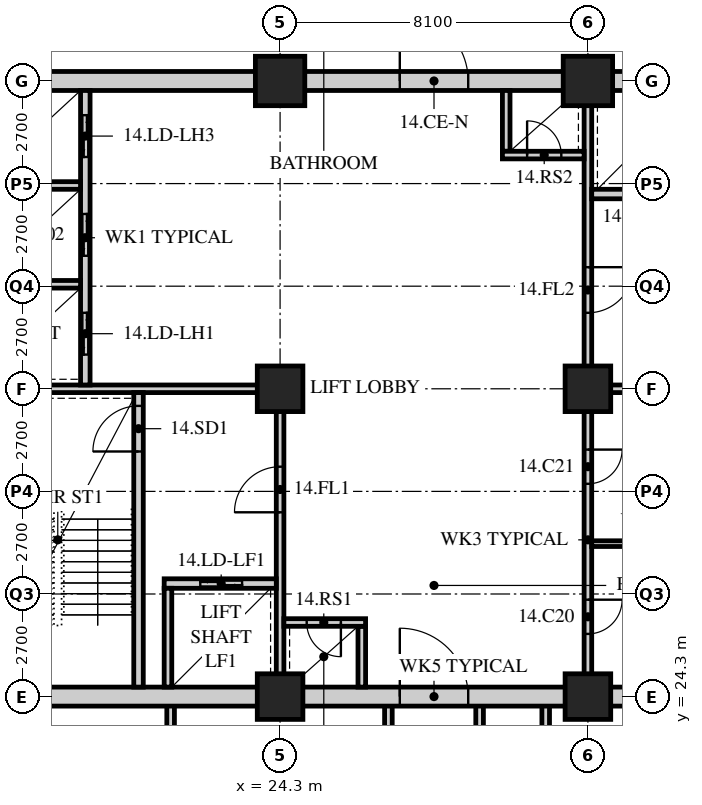
"""IFC4 building model, lengths in metres.
Left out: names, types, materials, properties, quantities, classifications, styles, units other than length and angle.
Written with IfcOpenShell. Run it as: python <this file> out.ifc"""

import sys

from ifc_helpers import new_model, si_unit, direction, frame, frame_2d, origin, origin_2d, place, context, subcontext, project, spatial, rectangle, hollow_rectangle, extrude, element, fill, save


model = new_model("IFC4")
c1 = context("Model", 3, precision=1e-05, world=origin(), true_north=direction((0.0, 1.0)))
c2 = subcontext(c1, "Body", "Model", "MODEL_VIEW")
j1 = project(units=[si_unit("LENGTHUNIT", "METRE"), si_unit("PLANEANGLEUNIT", "RADIAN")], contexts=[c1])
p1 = place(None, origin())
s1 = spatial("IfcSite", under=j1, at=p1, CompositionType="ELEMENT")
p2 = place(p1, origin())
s2 = spatial("IfcBuilding", under=s1, at=p2, CompositionType="ELEMENT")
p3 = place(p2, frame((0.0, 0.0, 60.2)))
s3 = spatial("IfcBuildingStorey", under=s2, at=p3, CompositionType="ELEMENT", Elevation=60.2)
for number, where, z_axis, x_axis in (
    (1, (24.3, 24.3, 0.0), (0.0, 0.0, 1.0), (1.0, 0.0, 0.0)),
    (2, (24.3, 32.4, 0.0), (0.0, 0.0, 1.0), (1.0, 0.0, 0.0)),
):
    element("IfcColumn", number, at=place(p3, frame(where, z_axis=z_axis, x_axis=x_axis)), inside=s3, PredefinedType="COLUMN", context=c2, shape_type="SweptSolid", body=[
        extrude(hollow_rectangle(XDim=1.2, YDim=1.2, WallThickness=0.12, at=origin_2d()), origin(), (0.0, 0.0, 1.0), 3.4),
    ])
p4 = place(p3, frame((24.3, 40.5, 0.0), z_axis=(0.0, 0.0, 1.0), x_axis=(1.0, 0.0, 0.0)))
e3 = element("IfcColumn", 3, at=p4, inside=s3, PredefinedType="COLUMN", context=c2, shape_type="SweptSolid", body=[
    extrude(hollow_rectangle(XDim=1.3, YDim=1.3, WallThickness=0.13, at=origin_2d()), origin(), (0.0, 0.0, 1.0), 3.4),
])
for number, where, z_axis, x_axis in (
    (4, (32.4, 24.3, 0.0), (0.0, 0.0, 1.0), (1.0, 0.0, 0.0)),
    (5, (32.4, 32.4, 0.0), (0.0, 0.0, 1.0), (1.0, 0.0, 0.0)),
):
    element("IfcColumn", number, at=place(p3, frame(where, z_axis=z_axis, x_axis=x_axis)), inside=s3, PredefinedType="COLUMN", context=c2, shape_type="SweptSolid", body=[
        extrude(hollow_rectangle(XDim=1.2, YDim=1.2, WallThickness=0.12, at=origin_2d()), origin(), (0.0, 0.0, 1.0), 3.4),
    ])
p5 = place(p3, frame((32.4, 40.5, 0.0), z_axis=(0.0, 0.0, 1.0), x_axis=(1.0, 0.0, 0.0)))
e6 = element("IfcColumn", 6, at=p5, inside=s3, PredefinedType="COLUMN", context=c2, shape_type="SweptSolid", body=[
    extrude(hollow_rectangle(XDim=1.3, YDim=1.3, WallThickness=0.13, at=origin_2d()), origin(), (0.0, 0.0, 1.0), 3.4),
])
for number, where, z_axis, x_axis in (
    (7, (21.42, 13.95, 0.0), (0.0, 0.0, 1.0), (0.0, 1.0, 0.0)),
    (8, (31.289, 13.95, 0.0), (0.0, 0.0, 1.0), (0.0, 1.0, 0.0)),
    (9, (27.15, 13.95, 0.0), (0.0, 0.0, 1.0), (0.0, 1.0, 0.0)),
    (10, (29.55, 13.95, 0.0), (0.0, 0.0, 1.0), (0.0, 1.0, 0.0)),
):
    element("IfcWall", number, at=place(p3, frame(where, z_axis=z_axis, x_axis=x_axis)), inside=s3, PredefinedType="SOLIDWALL", context=c2, shape_type="SweptSolid", body=[
        extrude(rectangle(XDim=10.35, YDim=0.2, at=frame_2d((5.175, 0.0))), origin(), (0.0, 0.0, 1.0), 3.19),
    ])
p6 = place(p3, frame((15.95, 24.3, 0.0), z_axis=(0.0, 0.0, 1.0), x_axis=(1.0, 0.0, 0.0)))
e11 = element("IfcWall", 11, at=p6, inside=s3, PredefinedType="SOLIDWALL", context=c2, shape_type="SweptSolid", body=[
    extrude(rectangle(XDim=24.8, YDim=0.5, at=frame_2d((12.4, 0.0))), origin(), (0.0, 0.0, 1.0), 2.54),
])
p7 = place(p6, frame((11.5, 0.0, 0.0)))
e12 = element("IfcOpeningElement", 12, at=p7, cuts=e11, PredefinedType="OPENING", context=c2, shape_type="SweptSolid", body=[
    extrude(rectangle(XDim=1.8, YDim=2.4, at=frame_2d((0.9, 1.2))), frame((0.0, 0.26, 0.0), z_axis=(0.0, -1.0, 0.0), x_axis=(1.0, 0.0, 0.0)), (0.0, 0.0, 1.0), 0.52),
])
p8 = place(p3, frame((15.95, 40.5, 0.0), z_axis=(0.0, 0.0, 1.0), x_axis=(1.0, 0.0, 0.0)))
e13 = element("IfcWall", 13, at=p8, inside=s3, PredefinedType="SOLIDWALL", context=c2, shape_type="SweptSolid", body=[
    extrude(rectangle(XDim=24.8, YDim=0.5, at=frame_2d((12.4, 0.0))), origin(), (0.0, 0.0, 1.0), 2.54),
])
p9 = place(p8, frame((11.5, 0.0, 0.0)))
e14 = element("IfcOpeningElement", 14, at=p9, cuts=e13, PredefinedType="OPENING", context=c2, shape_type="SweptSolid", body=[
    extrude(rectangle(XDim=1.8, YDim=2.4, at=frame_2d((0.9, 1.2))), frame((0.0, 0.26, 0.0), z_axis=(0.0, -1.0, 0.0), x_axis=(1.0, 0.0, 0.0)), (0.0, 0.0, 1.0), 0.52),
])
p10 = place(p3, frame((16.45, 32.4, 0.0), z_axis=(0.0, 0.0, 1.0), x_axis=(1.0, 0.0, 0.0)))
e15 = element("IfcWall", 15, at=p10, inside=s3, PredefinedType="SOLIDWALL", context=c2, shape_type="SweptSolid", body=[
    extrude(rectangle(XDim=7.95, YDim=0.2, at=frame_2d((3.975, 0.0))), origin(), (0.0, 0.0, 1.0), 2.578),
])
p11 = place(p3, frame((24.3, 24.55, 0.0), z_axis=(0.0, 0.0, 1.0), x_axis=(0.0, 1.0, 0.0)))
e16 = element("IfcWall", 16, at=p11, inside=s3, PredefinedType="SOLIDWALL", context=c2, shape_type="SweptSolid", body=[
    extrude(rectangle(XDim=7.75, YDim=0.2, at=frame_2d((3.875, 0.0))), origin(), (0.0, 0.0, 1.0), 2.578),
])
p12 = place(p11, frame((4.6, 0.0, 0.0)))
e17 = element("IfcOpeningElement", 17, at=p12, cuts=e16, PredefinedType="OPENING", context=c2, shape_type="SweptSolid", body=[
    extrude(rectangle(XDim=1.2, YDim=2.1, at=frame_2d((0.6, 1.05))), frame((0.0, 0.11, 0.0), z_axis=(0.0, -1.0, 0.0), x_axis=(1.0, 0.0, 0.0)), (0.0, 0.0, 1.0), 0.22),
])
p13 = place(p3, frame((20.575, 24.55, 0.0), z_axis=(0.0, 0.0, 1.0), x_axis=(0.0, 1.0, 0.0)))
e18 = element("IfcWall", 18, at=p13, inside=s3, PredefinedType="SOLIDWALL", context=c2, shape_type="SweptSolid", body=[
    extrude(rectangle(XDim=7.75, YDim=0.25, at=frame_2d((3.875, 0.0))), origin(), (0.0, 0.0, 1.0), 3.19),
])
p14 = place(p13, frame((6.2, 0.0, 0.0)))
e19 = element("IfcOpeningElement", 19, at=p14, cuts=e18, PredefinedType="OPENING", context=c2, shape_type="SweptSolid", body=[
    extrude(rectangle(XDim=1.2, YDim=2.1, at=frame_2d((0.6, 1.05))), frame((0.0, 0.135, 0.0), z_axis=(0.0, -1.0, 0.0), x_axis=(1.0, 0.0, 0.0)), (0.0, 0.0, 1.0), 0.27),
])
p15 = place(p3, frame((21.25, 27.275, 0.0), z_axis=(0.0, 0.0, 1.0), x_axis=(1.0, 0.0, 0.0)))
e20 = element("IfcWall", 20, at=p15, inside=s3, PredefinedType="SOLIDWALL", context=c2, shape_type="SweptSolid", body=[
    extrude(rectangle(XDim=2.95, YDim=0.25, at=frame_2d((1.475, 0.0))), origin(), (0.0, 0.0, 1.0), 3.19),
])
p16 = place(p15, frame((0.95, 0.0, 0.0)))
e21 = element("IfcOpeningElement", 21, at=p16, cuts=e20, PredefinedType="OPENING", context=c2, shape_type="SweptSolid", body=[
    extrude(rectangle(XDim=1.1, YDim=2.4, at=frame_2d((0.55, 1.2))), frame((0.0, 0.135, 0.0), z_axis=(0.0, -1.0, 0.0), x_axis=(1.0, 0.0, 0.0)), (0.0, 0.0, 1.0), 0.27),
])
p17 = place(p3, frame((21.35, 24.55, 0.0), z_axis=(0.0, 0.0, 1.0), x_axis=(0.0, 1.0, 0.0)))
e22 = element("IfcWall", 22, at=p17, inside=s3, PredefinedType="SOLIDWALL", context=c2, shape_type="SweptSolid", body=[
    extrude(rectangle(XDim=2.6, YDim=0.2, at=frame_2d((1.3, 0.0))), origin(), (0.0, 0.0, 1.0), 3.19),
])
p18 = place(p3, frame((19.175, 32.5, 0.0), z_axis=(0.0, 0.0, 1.0), x_axis=(0.0, 1.0, 0.0)))
e23 = element("IfcWall", 23, at=p18, inside=s3, PredefinedType="SOLIDWALL", context=c2, shape_type="SweptSolid", body=[
    extrude(rectangle(XDim=7.75, YDim=0.25, at=frame_2d((3.875, 0.0))), origin(), (0.0, 0.0, 1.0), 3.19),
])
p19 = place(p18, frame((0.8, 0.0, 0.0)))
e24 = element("IfcOpeningElement", 24, at=p19, cuts=e23, PredefinedType="OPENING", context=c2, shape_type="SweptSolid", body=[
    extrude(rectangle(XDim=1.1, YDim=2.4, at=frame_2d((0.55, 1.2))), frame((0.0, 0.135, 0.0), z_axis=(0.0, -1.0, 0.0), x_axis=(1.0, 0.0, 0.0)), (0.0, 0.0, 1.0), 0.27),
])
p20 = place(p18, frame((3.4, 0.0, 0.0)))
e25 = element("IfcOpeningElement", 25, at=p20, cuts=e23, PredefinedType="OPENING", context=c2, shape_type="SweptSolid", body=[
    extrude(rectangle(XDim=1.1, YDim=2.4, at=frame_2d((0.55, 1.2))), frame((0.0, 0.135, 0.0), z_axis=(0.0, -1.0, 0.0), x_axis=(1.0, 0.0, 0.0)), (0.0, 0.0, 1.0), 0.27),
])
p21 = place(p18, frame((6.0, 0.0, 0.0)))
e26 = element("IfcOpeningElement", 26, at=p21, cuts=e23, PredefinedType="OPENING", context=c2, shape_type="SweptSolid", body=[
    extrude(rectangle(XDim=1.1, YDim=2.4, at=frame_2d((0.55, 1.2))), frame((0.0, 0.135, 0.0), z_axis=(0.0, -1.0, 0.0), x_axis=(1.0, 0.0, 0.0)), (0.0, 0.0, 1.0), 0.27),
])
for number, where, z_axis, x_axis in (
    (27, (16.45, 35.15, 0.0), (0.0, 0.0, 1.0), (1.0, 0.0, 0.0)),
    (28, (16.45, 37.75, 0.0), (0.0, 0.0, 1.0), (1.0, 0.0, 0.0)),
):
    element("IfcWall", number, at=place(p3, frame(where, z_axis=z_axis, x_axis=x_axis)), inside=s3, PredefinedType="SOLIDWALL", context=c2, shape_type="SweptSolid", body=[
        extrude(rectangle(XDim=2.6, YDim=0.2, at=frame_2d((1.3, 0.0))), origin(), (0.0, 0.0, 1.0), 3.19),
    ])
p22 = place(p3, frame((26.45, 24.55, 0.0), z_axis=(0.0, 0.0, 1.0), x_axis=(0.0, 1.0, 0.0)))
e29 = element("IfcWall", 29, at=p22, inside=s3, PredefinedType="SOLIDWALL", context=c2, shape_type="SweptSolid", body=[
    extrude(rectangle(XDim=1.6, YDim=0.2, at=frame_2d((0.8, 0.0))), origin(), (0.0, 0.0, 1.0), 3.19),
])
p23 = place(p3, frame((24.4, 26.25, 0.0), z_axis=(0.0, 0.0, 1.0), x_axis=(1.0, 0.0, 0.0)))
e30 = element("IfcWall", 30, at=p23, inside=s3, PredefinedType="SOLIDWALL", context=c2, shape_type="SweptSolid", body=[
    extrude(rectangle(XDim=2.15, YDim=0.2, at=frame_2d((1.075, 0.0))), origin(), (0.0, 0.0, 1.0), 3.19),
])
p24 = place(p23, frame((0.6, 0.0, 0.0)))
e31 = element("IfcOpeningElement", 31, at=p24, cuts=e30, PredefinedType="OPENING", context=c2, shape_type="SweptSolid", body=[
    extrude(rectangle(XDim=0.9, YDim=2.1, at=frame_2d((0.45, 1.05))), frame((0.0, 0.11, 0.0), z_axis=(0.0, -1.0, 0.0), x_axis=(1.0, 0.0, 0.0)), (0.0, 0.0, 1.0), 0.22),
])
p25 = place(p3, frame((32.3, 32.4, 0.0), z_axis=(0.0, 0.0, 1.0), x_axis=(1.0, 0.0, 0.0)))
e32 = element("IfcWall", 32, at=p25, inside=s3, PredefinedType="SOLIDWALL", context=c2, shape_type="SweptSolid", body=[
    extrude(rectangle(XDim=7.95, YDim=0.2, at=frame_2d((3.975, 0.0))), origin(), (0.0, 0.0, 1.0), 2.578),
])
p26 = place(p3, frame((32.4, 32.5, 0.0), z_axis=(0.0, 0.0, 1.0), x_axis=(0.0, 1.0, 0.0)))
e33 = element("IfcWall", 33, at=p26, inside=s3, PredefinedType="SOLIDWALL", context=c2, shape_type="SweptSolid", body=[
    extrude(rectangle(XDim=7.75, YDim=0.2, at=frame_2d((3.875, 0.0))), origin(), (0.0, 0.0, 1.0), 2.578),
])
p27 = place(p26, frame((1.9, 0.0, 0.0)))
e34 = element("IfcOpeningElement", 34, at=p27, cuts=e33, PredefinedType="OPENING", context=c2, shape_type="SweptSolid", body=[
    extrude(rectangle(XDim=1.2, YDim=2.1, at=frame_2d((0.6, 1.05))), frame((0.0, 0.11, 0.0), z_axis=(0.0, -1.0, 0.0), x_axis=(1.0, 0.0, 0.0)), (0.0, 0.0, 1.0), 0.22),
])
p28 = place(p3, frame((32.5, 37.525, 0.0), z_axis=(0.0, 0.0, 1.0), x_axis=(1.0, 0.0, 0.0)))
e35 = element("IfcWall", 35, at=p28, inside=s3, PredefinedType="SOLIDWALL", context=c2, shape_type="SweptSolid", body=[
    extrude(rectangle(XDim=2.95, YDim=0.25, at=frame_2d((1.475, 0.0))), origin(), (0.0, 0.0, 1.0), 3.19),
])
p29 = place(p28, frame((0.9, 0.0, 0.0)))
e36 = element("IfcOpeningElement", 36, at=p29, cuts=e35, PredefinedType="OPENING", context=c2, shape_type="SweptSolid", body=[
    extrude(rectangle(XDim=1.1, YDim=2.4, at=frame_2d((0.55, 1.2))), frame((0.0, 0.135, 0.0), z_axis=(0.0, -1.0, 0.0), x_axis=(1.0, 0.0, 0.0)), (0.0, 0.0, 1.0), 0.27),
])
p30 = place(p3, frame((30.25, 38.65, 0.0), z_axis=(0.0, 0.0, 1.0), x_axis=(0.0, 1.0, 0.0)))
e37 = element("IfcWall", 37, at=p30, inside=s3, PredefinedType="SOLIDWALL", context=c2, shape_type="SweptSolid", body=[
    extrude(rectangle(XDim=1.6, YDim=0.2, at=frame_2d((0.8, 0.0))), origin(), (0.0, 0.0, 1.0), 3.19),
])
p31 = place(p3, frame((30.15, 38.55, 0.0), z_axis=(0.0, 0.0, 1.0), x_axis=(1.0, 0.0, 0.0)))
e38 = element("IfcWall", 38, at=p31, inside=s3, PredefinedType="SOLIDWALL", context=c2, shape_type="SweptSolid", body=[
    extrude(rectangle(XDim=2.15, YDim=0.2, at=frame_2d((1.075, 0.0))), origin(), (0.0, 0.0, 1.0), 3.19),
])
p32 = place(p31, frame((0.65, 0.0, 0.0)))
e39 = element("IfcOpeningElement", 39, at=p32, cuts=e38, PredefinedType="OPENING", context=c2, shape_type="SweptSolid", body=[
    extrude(rectangle(XDim=0.9, YDim=2.1, at=frame_2d((0.45, 1.05))), frame((0.0, 0.11, 0.0), z_axis=(0.0, -1.0, 0.0), x_axis=(1.0, 0.0, 0.0)), (0.0, 0.0, 1.0), 0.22),
])
p33 = place(p3, frame((32.4, 24.55, 0.0), z_axis=(0.0, 0.0, 1.0), x_axis=(0.0, 1.0, 0.0)))
e40 = element("IfcWall", 40, at=p33, inside=s3, PredefinedType="PARTITIONING", context=c2, shape_type="SweptSolid", body=[
    extrude(rectangle(XDim=7.75, YDim=0.2, at=frame_2d((3.875, 0.0))), origin(), (0.0, 0.0, 1.0), 2.578),
])
p34 = place(p33, frame((1.4, 0.0, 0.0)))
e41 = element("IfcOpeningElement", 41, at=p34, cuts=e40, PredefinedType="OPENING", context=c2, shape_type="SweptSolid", body=[
    extrude(rectangle(XDim=0.9, YDim=2.1, at=frame_2d((0.45, 1.05))), frame((0.0, 0.11, 0.0), z_axis=(0.0, -1.0, 0.0), x_axis=(1.0, 0.0, 0.0)), (0.0, 0.0, 1.0), 0.22),
])
p35 = place(p33, frame((5.35, 0.0, 0.0)))
e42 = element("IfcOpeningElement", 42, at=p35, cuts=e40, PredefinedType="OPENING", context=c2, shape_type="SweptSolid", body=[
    extrude(rectangle(XDim=0.9, YDim=2.1, at=frame_2d((0.45, 1.05))), frame((0.0, 0.11, 0.0), z_axis=(0.0, -1.0, 0.0), x_axis=(1.0, 0.0, 0.0)), (0.0, 0.0, 1.0), 0.22),
])
p36 = place(p3, frame((32.5, 28.325, 0.0), z_axis=(0.0, 0.0, 1.0), x_axis=(1.0, 0.0, 0.0)))
e43 = element("IfcWall", 43, at=p36, inside=s3, PredefinedType="PARTITIONING", context=c2, shape_type="SweptSolid", body=[
    extrude(rectangle(XDim=4.9, YDim=0.15, at=frame_2d((2.45, 0.0))), origin(), (0.0, 0.0, 1.0), 3.19),
])
p37 = place(p34, origin())
e44 = element("IfcDoor", 44, at=p37, inside=s3, OperationType="SINGLE_SWING_LEFT", PredefinedType="DOOR", context=c2, shape_type="SweptSolid", body=[
    extrude(rectangle(XDim=0.9, YDim=2.1, at=frame_2d((0.45, 1.05))), frame((0.0, 0.025, 0.0), z_axis=(0.0, -1.0, 0.0), x_axis=(1.0, 0.0, 0.0)), (0.0, 0.0, 1.0), 0.05),
])
fill(e41, e44)
p38 = place(p35, origin())
e45 = element("IfcDoor", 45, at=p38, inside=s3, OperationType="SINGLE_SWING_LEFT", PredefinedType="DOOR", context=c2, shape_type="SweptSolid", body=[
    extrude(rectangle(XDim=0.9, YDim=2.1, at=frame_2d((0.45, 1.05))), frame((0.0, 0.025, 0.0), z_axis=(0.0, -1.0, 0.0), x_axis=(1.0, 0.0, 0.0)), (0.0, 0.0, 1.0), 0.05),
])
fill(e42, e45)
p39 = place(p14, origin())
e46 = element("IfcDoor", 46, at=p39, inside=s3, OperationType="SINGLE_SWING_LEFT", PredefinedType="DOOR", context=c2, shape_type="SweptSolid", body=[
    extrude(rectangle(XDim=1.2, YDim=2.1, at=frame_2d((0.6, 1.05))), frame((0.0, 0.025, 0.0), z_axis=(0.0, -1.0, 0.0), x_axis=(1.0, 0.0, 0.0)), (0.0, 0.0, 1.0), 0.05),
])
fill(e19, e46)
p40 = place(p12, origin())
e47 = element("IfcDoor", 47, at=p40, inside=s3, OperationType="SINGLE_SWING_LEFT", PredefinedType="DOOR", context=c2, shape_type="SweptSolid", body=[
    extrude(rectangle(XDim=1.2, YDim=2.1, at=frame_2d((0.6, 1.05))), frame((0.0, 0.025, 0.0), z_axis=(0.0, -1.0, 0.0), x_axis=(1.0, 0.0, 0.0)), (0.0, 0.0, 1.0), 0.05),
])
fill(e17, e47)
p41 = place(p24, origin())
e48 = element("IfcDoor", 48, at=p41, inside=s3, OperationType="SINGLE_SWING_LEFT", PredefinedType="DOOR", context=c2, shape_type="SweptSolid", body=[
    extrude(rectangle(XDim=0.9, YDim=2.1, at=frame_2d((0.45, 1.05))), frame((0.0, 0.025, 0.0), z_axis=(0.0, -1.0, 0.0), x_axis=(1.0, 0.0, 0.0)), (0.0, 0.0, 1.0), 0.05),
])
fill(e31, e48)
p42 = place(p27, origin())
e49 = element("IfcDoor", 49, at=p42, inside=s3, OperationType="SINGLE_SWING_LEFT", PredefinedType="DOOR", context=c2, shape_type="SweptSolid", body=[
    extrude(rectangle(XDim=1.2, YDim=2.1, at=frame_2d((0.6, 1.05))), frame((0.0, 0.025, 0.0), z_axis=(0.0, -1.0, 0.0), x_axis=(1.0, 0.0, 0.0)), (0.0, 0.0, 1.0), 0.05),
])
fill(e34, e49)
p43 = place(p32, origin())
e50 = element("IfcDoor", 50, at=p43, inside=s3, OperationType="SINGLE_SWING_LEFT", PredefinedType="DOOR", context=c2, shape_type="SweptSolid", body=[
    extrude(rectangle(XDim=0.9, YDim=2.1, at=frame_2d((0.45, 1.05))), frame((0.0, 0.025, 0.0), z_axis=(0.0, -1.0, 0.0), x_axis=(1.0, 0.0, 0.0)), (0.0, 0.0, 1.0), 0.05),
])
fill(e39, e50)
p44 = place(p19, origin())
e51 = element("IfcDoor", 51, at=p44, inside=s3, OperationType="DOUBLE_DOOR_SLIDING", PredefinedType="DOOR", context=c2, shape_type="SweptSolid", body=[
    extrude(rectangle(XDim=1.1, YDim=2.4, at=frame_2d((0.55, 1.2))), frame((0.0, 0.025, 0.0), z_axis=(0.0, -1.0, 0.0), x_axis=(1.0, 0.0, 0.0)), (0.0, 0.0, 1.0), 0.05),
])
fill(e24, e51)
p45 = place(p20, origin())
e52 = element("IfcDoor", 52, at=p45, inside=s3, OperationType="DOUBLE_DOOR_SLIDING", PredefinedType="DOOR", context=c2, shape_type="SweptSolid", body=[
    extrude(rectangle(XDim=1.1, YDim=2.4, at=frame_2d((0.55, 1.2))), frame((0.0, 0.025, 0.0), z_axis=(0.0, -1.0, 0.0), x_axis=(1.0, 0.0, 0.0)), (0.0, 0.0, 1.0), 0.05),
])
fill(e25, e52)
p46 = place(p21, origin())
e53 = element("IfcDoor", 53, at=p46, inside=s3, OperationType="DOUBLE_DOOR_SLIDING", PredefinedType="DOOR", context=c2, shape_type="SweptSolid", body=[
    extrude(rectangle(XDim=1.1, YDim=2.4, at=frame_2d((0.55, 1.2))), frame((0.0, 0.025, 0.0), z_axis=(0.0, -1.0, 0.0), x_axis=(1.0, 0.0, 0.0)), (0.0, 0.0, 1.0), 0.05),
])
fill(e26, e53)
p47 = place(p16, origin())
e54 = element("IfcDoor", 54, at=p47, inside=s3, OperationType="DOUBLE_DOOR_SLIDING", PredefinedType="DOOR", context=c2, shape_type="SweptSolid", body=[
    extrude(rectangle(XDim=1.1, YDim=2.4, at=frame_2d((0.55, 1.2))), frame((0.0, 0.025, 0.0), z_axis=(0.0, -1.0, 0.0), x_axis=(1.0, 0.0, 0.0)), (0.0, 0.0, 1.0), 0.05),
])
fill(e21, e54)
p48 = place(p7, origin())
e55 = element("IfcDoor", 55, at=p48, inside=s3, OperationType="DOUBLE_DOOR_SINGLE_SWING", PredefinedType="DOOR", context=c2, shape_type="SweptSolid", body=[
    extrude(rectangle(XDim=1.8, YDim=2.4, at=frame_2d((0.9, 1.2))), frame((0.0, 0.025, 0.0), z_axis=(0.0, -1.0, 0.0), x_axis=(1.0, 0.0, 0.0)), (0.0, 0.0, 1.0), 0.05),
])
fill(e12, e55)
p49 = place(p9, origin())
e56 = element("IfcDoor", 56, at=p49, inside=s3, OperationType="DOUBLE_DOOR_SINGLE_SWING", PredefinedType="DOOR", context=c2, shape_type="SweptSolid", body=[
    extrude(rectangle(XDim=1.8, YDim=2.4, at=frame_2d((0.9, 1.2))), frame((0.0, 0.025, 0.0), z_axis=(0.0, -1.0, 0.0), x_axis=(1.0, 0.0, 0.0)), (0.0, 0.0, 1.0), 0.05),
])
fill(e14, e56)
save(model, sys.argv[1])
